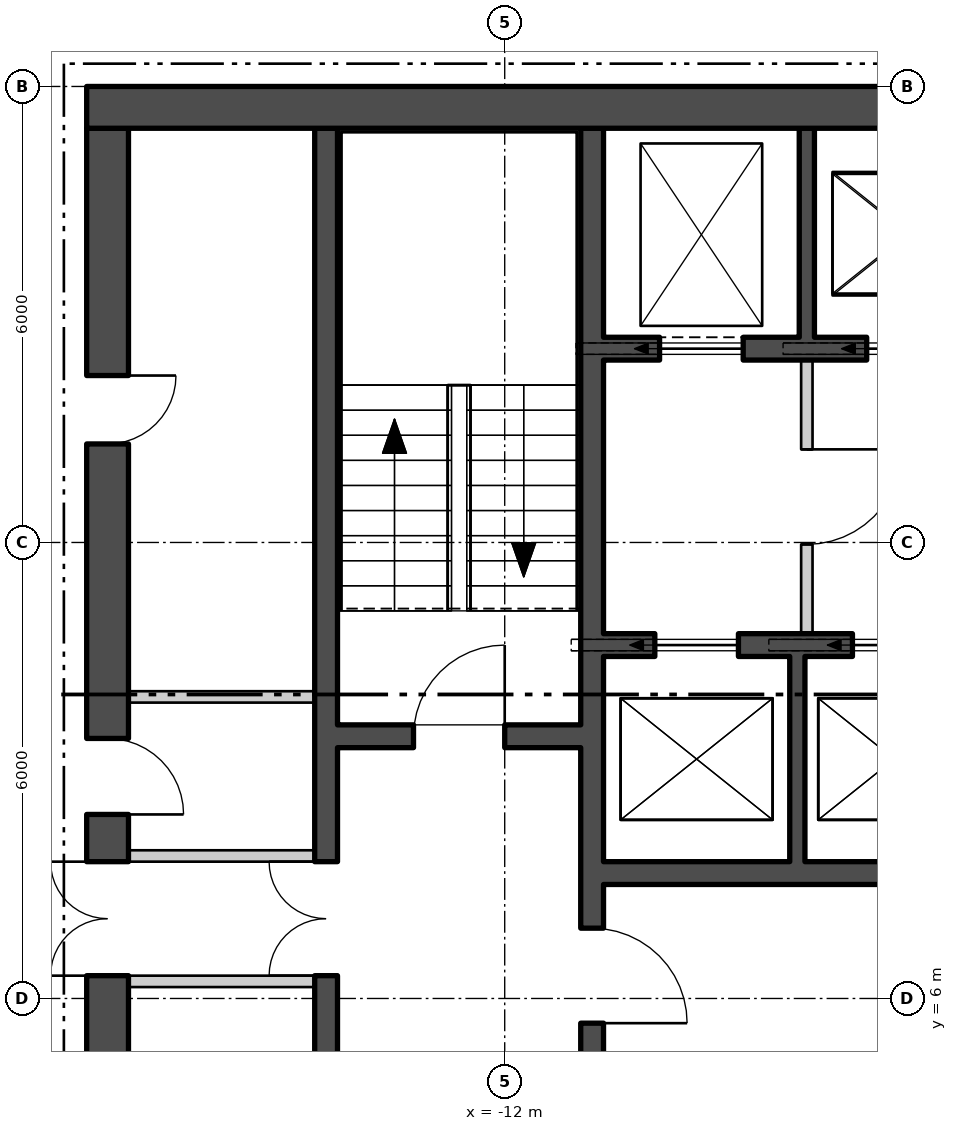
"""IFC4 building model, lengths in metres.
Left out: names, types, materials, properties, quantities, classifications, styles, units other than length and angle.
Written with IfcOpenShell. Run it as: python <this file> out.ifc"""

import sys

from ifc_helpers import new_model, si_unit, direction, frame, frame_2d, origin, place, context, subcontext, project, spatial, polyline, rectangle, outline, extrude, element, fill, save


model = new_model("IFC4")
c1 = context("Model", 3, precision=1e-05, world=origin(), true_north=direction((0.0, 1.0)))
c2 = subcontext(c1, "Body", "Model", "MODEL_VIEW")
j1 = project(units=[si_unit("LENGTHUNIT", "METRE"), si_unit("PLANEANGLEUNIT", "RADIAN")], contexts=[c1])
p1 = place(None, origin())
s1 = spatial("IfcSite", under=j1, at=p1, CompositionType="ELEMENT")
p2 = place(p1, origin())
s2 = spatial("IfcBuilding", under=s1, at=p2, CompositionType="ELEMENT")
p3 = place(p2, frame((0.0, 0.0, 133.8)))
s3 = spatial("IfcBuildingStorey", under=s2, at=p3, CompositionType="ELEMENT", Elevation=133.8)
p4 = place(p3, frame((-27.365, 12.198, -0.18), z_axis=(0.0, 0.0, 1.0), x_axis=(0.500000335318, -0.866025210188, 0.0)))
e1 = element("IfcWall", 1, at=p4, inside=s3, PredefinedType="SOLIDWALL", context=c2, shape_type="SweptSolid", body=[
    extrude(outline(polyline([(-0.13, -0.225), (45.88, -0.225), (45.62, 0.225), (0.13, 0.225), (-0.13, -0.225)])), origin(), (0.0, 0.0, 1.0), 6.0),
])
p5 = place(p4, frame((1.425, 0.0, 1.38)))
e2 = element("IfcOpeningElement", 2, at=p5, cuts=e1, PredefinedType="OPENING", context=c2, shape_type="SweptSolid", body=[
    extrude(rectangle(XDim=2.4, YDim=3.6, at=frame_2d((1.2, 1.8))), frame((0.0, 0.235, 0.0), z_axis=(0.0, -1.0, 0.0), x_axis=(1.0, 0.0, 0.0)), (0.0, 0.0, 1.0), 0.47),
])
p6 = place(p4, frame((5.895, 0.0, 1.38)))
e3 = element("IfcOpeningElement", 3, at=p6, cuts=e1, PredefinedType="OPENING", context=c2, shape_type="SweptSolid", body=[
    extrude(rectangle(XDim=2.4, YDim=3.6, at=frame_2d((1.2, 1.8))), frame((0.0, 0.235, 0.0), z_axis=(0.0, -1.0, 0.0), x_axis=(1.0, 0.0, 0.0)), (0.0, 0.0, 1.0), 0.47),
])
p7 = place(p4, frame((10.403, 0.0, 1.38)))
e4 = element("IfcOpeningElement", 4, at=p7, cuts=e1, PredefinedType="OPENING", context=c2, shape_type="SweptSolid", body=[
    extrude(rectangle(XDim=2.4, YDim=3.6, at=frame_2d((1.2, 1.8))), frame((0.0, 0.235, 0.0), z_axis=(0.0, -1.0, 0.0), x_axis=(1.0, 0.0, 0.0)), (0.0, 0.0, 1.0), 0.47),
])
p8 = place(p4, frame((14.912, 0.0, 1.38)))
e5 = element("IfcOpeningElement", 5, at=p8, cuts=e1, PredefinedType="OPENING", context=c2, shape_type="SweptSolid", body=[
    extrude(rectangle(XDim=2.4, YDim=3.6, at=frame_2d((1.2, 1.8))), frame((0.0, 0.235, 0.0), z_axis=(0.0, -1.0, 0.0), x_axis=(1.0, 0.0, 0.0)), (0.0, 0.0, 1.0), 0.47),
])
p9 = place(p4, frame((19.421, 0.0, 1.38)))
e6 = element("IfcOpeningElement", 6, at=p9, cuts=e1, PredefinedType="OPENING", context=c2, shape_type="SweptSolid", body=[
    extrude(rectangle(XDim=2.4, YDim=3.6, at=frame_2d((1.2, 1.8))), frame((0.0, 0.235, 0.0), z_axis=(0.0, -1.0, 0.0), x_axis=(1.0, 0.0, 0.0)), (0.0, 0.0, 1.0), 0.47),
])
p10 = place(p4, frame((23.929, 0.0, 1.38)))
e7 = element("IfcOpeningElement", 7, at=p10, cuts=e1, PredefinedType="OPENING", context=c2, shape_type="SweptSolid", body=[
    extrude(rectangle(XDim=2.4, YDim=3.6, at=frame_2d((1.2, 1.8))), frame((0.0, 0.235, 0.0), z_axis=(0.0, -1.0, 0.0), x_axis=(1.0, 0.0, 0.0)), (0.0, 0.0, 1.0), 0.47),
])
p11 = place(p4, frame((28.438, 0.0, 1.38)))
e8 = element("IfcOpeningElement", 8, at=p11, cuts=e1, PredefinedType="OPENING", context=c2, shape_type="SweptSolid", body=[
    extrude(rectangle(XDim=2.4, YDim=3.6, at=frame_2d((1.2, 1.8))), frame((0.0, 0.235, 0.0), z_axis=(0.0, -1.0, 0.0), x_axis=(1.0, 0.0, 0.0)), (0.0, 0.0, 1.0), 0.47),
])
p12 = place(p4, frame((32.947, 0.0, 1.38)))
e9 = element("IfcOpeningElement", 9, at=p12, cuts=e1, PredefinedType="OPENING", context=c2, shape_type="SweptSolid", body=[
    extrude(rectangle(XDim=2.4, YDim=3.6, at=frame_2d((1.2, 1.8))), frame((0.0, 0.235, 0.0), z_axis=(0.0, -1.0, 0.0), x_axis=(1.0, 0.0, 0.0)), (0.0, 0.0, 1.0), 0.47),
])
p13 = place(p4, frame((37.455, 0.0, 1.38)))
e10 = element("IfcOpeningElement", 10, at=p13, cuts=e1, PredefinedType="OPENING", context=c2, shape_type="SweptSolid", body=[
    extrude(rectangle(XDim=2.4, YDim=3.6, at=frame_2d((1.2, 1.8))), frame((0.0, 0.235, 0.0), z_axis=(0.0, -1.0, 0.0), x_axis=(1.0, 0.0, 0.0)), (0.0, 0.0, 1.0), 0.47),
])
p14 = place(p4, frame((41.925, 0.0, 1.38)))
e11 = element("IfcOpeningElement", 11, at=p14, cuts=e1, PredefinedType="OPENING", context=c2, shape_type="SweptSolid", body=[
    extrude(rectangle(XDim=2.4, YDim=3.6, at=frame_2d((1.2, 1.8))), frame((0.0, 0.235, 0.0), z_axis=(0.0, -1.0, 0.0), x_axis=(1.0, 0.0, 0.0)), (0.0, 0.0, 1.0), 0.47),
])
p15 = place(p3, frame((-17.5, 17.725, 0.0), z_axis=(0.0, 0.0, 1.0), x_axis=(1.0, 0.0, 0.0)))
e12 = element("IfcWall", 12, at=p15, inside=s3, PredefinedType="SHEAR", context=c2, shape_type="SweptSolid", body=[
    extrude(rectangle(XDim=35.0, YDim=0.55, at=frame_2d((17.5, 0.0))), origin(), (0.0, 0.0, 1.0), 5.8),
])
p16 = place(p3, frame((-17.225, 0.55, 0.0), z_axis=(0.0, 0.0, 1.0), x_axis=(0.0, 1.0, 0.0)))
e13 = element("IfcWall", 13, at=p16, inside=s3, PredefinedType="SHEAR", context=c2, shape_type="SweptSolid", body=[
    extrude(rectangle(XDim=16.9, YDim=0.55, at=frame_2d((8.45, 0.0))), origin(), (0.0, 0.0, 1.0), 5.8),
])
p17 = place(p16, frame((5.75, 0.0, 0.0)))
e14 = element("IfcOpeningElement", 14, at=p17, cuts=e13, PredefinedType="OPENING", context=c2, shape_type="SweptSolid", body=[
    extrude(rectangle(XDim=1.5, YDim=2.1, at=frame_2d((0.75, 1.05))), frame((0.0, 0.285, 0.0), z_axis=(0.0, -1.0, 0.0), x_axis=(1.0, 0.0, 0.0)), (0.0, 0.0, 1.0), 0.57),
])
p18 = place(p16, frame((0.4, 0.0, 0.0)))
e15 = element("IfcOpeningElement", 15, at=p18, cuts=e13, PredefinedType="OPENING", context=c2, shape_type="SweptSolid", body=[
    extrude(rectangle(XDim=0.9, YDim=2.1, at=frame_2d((0.45, 1.05))), frame((0.0, 0.285, 0.0), z_axis=(0.0, -1.0, 0.0), x_axis=(1.0, 0.0, 0.0)), (0.0, 0.0, 1.0), 0.57),
])
p19 = place(p16, frame((2.289, 0.0, 0.0)))
e16 = element("IfcOpeningElement", 16, at=p19, cuts=e13, PredefinedType="OPENING", context=c2, shape_type="SweptSolid", body=[
    extrude(rectangle(XDim=0.9, YDim=2.1, at=frame_2d((0.45, 1.05))), frame((0.0, 0.285, 0.0), z_axis=(0.0, -1.0, 0.0), x_axis=(1.0, 0.0, 0.0)), (0.0, 0.0, 1.0), 0.57),
])
p20 = place(p16, frame((7.871, 0.0, 0.0)))
e17 = element("IfcOpeningElement", 17, at=p20, cuts=e13, PredefinedType="OPENING", context=c2, shape_type="SweptSolid", body=[
    extrude(rectangle(XDim=1.0, YDim=2.1, at=frame_2d((0.5, 1.05))), frame((0.0, 0.285, 0.0), z_axis=(0.0, -1.0, 0.0), x_axis=(1.0, 0.0, 0.0)), (0.0, 0.0, 1.0), 0.57),
])
p21 = place(p16, frame((12.746, 0.0, 0.0)))
e18 = element("IfcOpeningElement", 18, at=p21, cuts=e13, PredefinedType="OPENING", context=c2, shape_type="SweptSolid", body=[
    extrude(rectangle(XDim=0.9, YDim=2.1, at=frame_2d((0.45, 1.05))), frame((0.0, 0.285, 0.0), z_axis=(0.0, -1.0, 0.0), x_axis=(1.0, 0.0, 0.0)), (0.0, 0.0, 1.0), 0.57),
])
p22 = place(p3, frame((-10.85, 0.55, 0.0), z_axis=(0.0, 0.0, 1.0), x_axis=(0.0, 1.0, 0.0)))
e19 = element("IfcWall", 19, at=p22, inside=s3, PredefinedType="SHEAR", context=c2, shape_type="SweptSolid", body=[
    extrude(rectangle(XDim=16.9, YDim=0.3, at=frame_2d((8.45, 0.0))), origin(), (0.0, 0.0, 1.0), 5.8),
])
p23 = place(p22, frame((5.125, 0.0, 0.0)))
e20 = element("IfcOpeningElement", 20, at=p23, cuts=e19, PredefinedType="OPENING", context=c2, shape_type="SweptSolid", body=[
    extrude(rectangle(XDim=1.25, YDim=2.1, at=frame_2d((0.625, 1.05))), frame((0.0, 0.16, 0.0), z_axis=(0.0, -1.0, 0.0), x_axis=(1.0, 0.0, 0.0)), (0.0, 0.0, 1.0), 0.32),
])
p24 = place(p22, frame((1.55, 0.0, 0.0)))
e21 = element("IfcOpeningElement", 21, at=p24, cuts=e19, PredefinedType="OPENING", context=c2, shape_type="SweptSolid", body=[
    extrude(rectangle(XDim=1.0, YDim=2.1, at=frame_2d((0.5, 1.05))), frame((0.0, 0.16, 0.0), z_axis=(0.0, -1.0, 0.0), x_axis=(1.0, 0.0, 0.0)), (0.0, 0.0, 1.0), 0.32),
])
p25 = place(p3, frame((-14.35, 0.55, 0.0), z_axis=(0.0, 0.0, 1.0), x_axis=(0.0, 1.0, 0.0)))
e22 = element("IfcWall", 22, at=p25, inside=s3, PredefinedType="SHEAR", context=c2, shape_type="SweptSolid", body=[
    extrude(rectangle(XDim=16.9, YDim=0.3, at=frame_2d((8.45, 0.0))), origin(), (0.0, 0.0, 1.0), 5.8),
])
p26 = place(p25, frame((5.75, 0.0, 0.0)))
e23 = element("IfcOpeningElement", 23, at=p26, cuts=e22, PredefinedType="OPENING", context=c2, shape_type="SweptSolid", body=[
    extrude(rectangle(XDim=1.5, YDim=2.1, at=frame_2d((0.75, 1.05))), frame((0.0, 0.16, 0.0), z_axis=(0.0, -1.0, 0.0), x_axis=(1.0, 0.0, 0.0)), (0.0, 0.0, 1.0), 0.32),
])
p27 = place(p3, frame((-14.2, 9.45, 0.0), z_axis=(0.0, 0.0, 1.0), x_axis=(1.0, 0.0, 0.0)))
e24 = element("IfcWall", 24, at=p27, inside=s3, PredefinedType="SHEAR", context=c2, shape_type="SweptSolid", body=[
    extrude(rectangle(XDim=3.2, YDim=0.3, at=frame_2d((1.6, 0.0))), origin(), (0.0, 0.0, 1.0), 5.8),
])
p28 = place(p27, frame((1.0, 0.0, 0.0)))
e25 = element("IfcOpeningElement", 25, at=p28, cuts=e24, PredefinedType="OPENING", context=c2, shape_type="SweptSolid", body=[
    extrude(rectangle(XDim=1.2, YDim=2.1, at=frame_2d((0.6, 1.05))), frame((0.0, 0.16, 0.0), z_axis=(0.0, -1.0, 0.0), x_axis=(1.0, 0.0, 0.0)), (0.0, 0.0, 1.0), 0.32),
])
p29 = place(p3, frame((-10.7, 14.55, 0.0), z_axis=(0.0, 0.0, 1.0), x_axis=(1.0, 0.0, 0.0)))
e26 = element("IfcWall", 26, at=p29, inside=s3, PredefinedType="SHEAR", context=c2, shape_type="SweptSolid", body=[
    extrude(rectangle(XDim=21.4, YDim=0.3, at=frame_2d((10.7, 0.0))), origin(), (0.0, 0.0, 1.0), 5.8),
])
p30 = place(p29, frame((0.738, 0.0, 0.0)))
e27 = element("IfcOpeningElement", 27, at=p30, cuts=e26, PredefinedType="OPENING", context=c2, shape_type="SweptSolid", body=[
    extrude(rectangle(XDim=1.1, YDim=2.1, at=frame_2d((0.55, 1.05))), frame((0.0, 0.16, 0.0), z_axis=(0.0, -1.0, 0.0), x_axis=(1.0, 0.0, 0.0)), (0.0, 0.0, 1.0), 0.32),
])
p31 = place(p29, frame((3.462, 0.0, 0.0)))
e28 = element("IfcOpeningElement", 28, at=p31, cuts=e26, PredefinedType="OPENING", context=c2, shape_type="SweptSolid", body=[
    extrude(rectangle(XDim=1.1, YDim=2.1, at=frame_2d((0.55, 1.05))), frame((0.0, 0.16, 0.0), z_axis=(0.0, -1.0, 0.0), x_axis=(1.0, 0.0, 0.0)), (0.0, 0.0, 1.0), 0.32),
])
p32 = place(p29, frame((6.138, 0.0, 0.0)))
e29 = element("IfcOpeningElement", 29, at=p32, cuts=e26, PredefinedType="OPENING", context=c2, shape_type="SweptSolid", body=[
    extrude(rectangle(XDim=1.1, YDim=2.1, at=frame_2d((0.55, 1.05))), frame((0.0, 0.16, 0.0), z_axis=(0.0, -1.0, 0.0), x_axis=(1.0, 0.0, 0.0)), (0.0, 0.0, 1.0), 0.32),
])
p33 = place(p29, frame((8.812, 0.0, 0.0)))
e30 = element("IfcOpeningElement", 30, at=p33, cuts=e26, PredefinedType="OPENING", context=c2, shape_type="SweptSolid", body=[
    extrude(rectangle(XDim=1.1, YDim=2.1, at=frame_2d((0.55, 1.05))), frame((0.0, 0.16, 0.0), z_axis=(0.0, -1.0, 0.0), x_axis=(1.0, 0.0, 0.0)), (0.0, 0.0, 1.0), 0.32),
])
p34 = place(p29, frame((11.488, 0.0, 0.0)))
e31 = element("IfcOpeningElement", 31, at=p34, cuts=e26, PredefinedType="OPENING", context=c2, shape_type="SweptSolid", body=[
    extrude(rectangle(XDim=1.1, YDim=2.1, at=frame_2d((0.55, 1.05))), frame((0.0, 0.16, 0.0), z_axis=(0.0, -1.0, 0.0), x_axis=(1.0, 0.0, 0.0)), (0.0, 0.0, 1.0), 0.32),
])
p35 = place(p29, frame((14.162, 0.0, 0.0)))
e32 = element("IfcOpeningElement", 32, at=p35, cuts=e26, PredefinedType="OPENING", context=c2, shape_type="SweptSolid", body=[
    extrude(rectangle(XDim=1.1, YDim=2.1, at=frame_2d((0.55, 1.05))), frame((0.0, 0.16, 0.0), z_axis=(0.0, -1.0, 0.0), x_axis=(1.0, 0.0, 0.0)), (0.0, 0.0, 1.0), 0.32),
])
p36 = place(p29, frame((16.837, 0.0, 0.0)))
e33 = element("IfcOpeningElement", 33, at=p36, cuts=e26, PredefinedType="OPENING", context=c2, shape_type="SweptSolid", body=[
    extrude(rectangle(XDim=1.1, YDim=2.1, at=frame_2d((0.55, 1.05))), frame((0.0, 0.16, 0.0), z_axis=(0.0, -1.0, 0.0), x_axis=(1.0, 0.0, 0.0)), (0.0, 0.0, 1.0), 0.32),
])
p37 = place(p29, frame((19.562, 0.0, 0.0)))
e34 = element("IfcOpeningElement", 34, at=p37, cuts=e26, PredefinedType="OPENING", context=c2, shape_type="SweptSolid", body=[
    extrude(rectangle(XDim=1.1, YDim=2.1, at=frame_2d((0.55, 1.05))), frame((0.0, 0.16, 0.0), z_axis=(0.0, -1.0, 0.0), x_axis=(1.0, 0.0, 0.0)), (0.0, 0.0, 1.0), 0.32),
])
p38 = place(p3, frame((-10.7, 10.65, 0.0), z_axis=(0.0, 0.0, 1.0), x_axis=(1.0, 0.0, 0.0)))
e35 = element("IfcWall", 35, at=p38, inside=s3, PredefinedType="SHEAR", context=c2, shape_type="SweptSolid", body=[
    extrude(rectangle(XDim=10.3, YDim=0.3, at=frame_2d((5.15, 0.0))), origin(), (0.0, 0.0, 1.0), 5.8),
])
p39 = place(p38, frame((0.675, 0.0, 0.0)))
e36 = element("IfcOpeningElement", 36, at=p39, cuts=e35, PredefinedType="OPENING", context=c2, shape_type="SweptSolid", body=[
    extrude(rectangle(XDim=1.1, YDim=2.1, at=frame_2d((0.55, 1.05))), frame((0.0, 0.16, 0.0), z_axis=(0.0, -1.0, 0.0), x_axis=(1.0, 0.0, 0.0)), (0.0, 0.0, 1.0), 0.32),
])
p40 = place(p38, frame((3.275, 0.0, 0.0)))
e37 = element("IfcOpeningElement", 37, at=p40, cuts=e35, PredefinedType="OPENING", context=c2, shape_type="SweptSolid", body=[
    extrude(rectangle(XDim=1.1, YDim=2.1, at=frame_2d((0.55, 1.05))), frame((0.0, 0.16, 0.0), z_axis=(0.0, -1.0, 0.0), x_axis=(1.0, 0.0, 0.0)), (0.0, 0.0, 1.0), 0.32),
])
p41 = place(p38, frame((5.825, 0.0, 0.0)))
e38 = element("IfcOpeningElement", 38, at=p41, cuts=e35, PredefinedType="OPENING", context=c2, shape_type="SweptSolid", body=[
    extrude(rectangle(XDim=1.1, YDim=2.1, at=frame_2d((0.55, 1.05))), frame((0.0, 0.16, 0.0), z_axis=(0.0, -1.0, 0.0), x_axis=(1.0, 0.0, 0.0)), (0.0, 0.0, 1.0), 0.32),
])
p42 = place(p38, frame((8.425, 0.0, 0.0)))
e39 = element("IfcOpeningElement", 39, at=p42, cuts=e35, PredefinedType="OPENING", context=c2, shape_type="SweptSolid", body=[
    extrude(rectangle(XDim=1.0, YDim=2.1, at=frame_2d((0.5, 1.05))), frame((0.0, 0.16, 0.0), z_axis=(0.0, -1.0, 0.0), x_axis=(1.0, 0.0, 0.0)), (0.0, 0.0, 1.0), 0.32),
])
p43 = place(p3, frame((-10.7, 7.65, 0.0), z_axis=(0.0, 0.0, 1.0), x_axis=(1.0, 0.0, 0.0)))
e40 = element("IfcWall", 40, at=p43, inside=s3, PredefinedType="SHEAR", context=c2, shape_type="SweptSolid", body=[
    extrude(rectangle(XDim=10.3, YDim=0.3, at=frame_2d((5.15, 0.0))), origin(), (0.0, 0.0, 1.0), 5.8),
])
p44 = place(p3, frame((-8.025, 14.7, 0.0), z_axis=(0.0, 0.0, 1.0), x_axis=(0.0, 1.0, 0.0)))
e41 = element("IfcWall", 41, at=p44, inside=s3, PredefinedType="SHEAR", context=c2, shape_type="SweptSolid", body=[
    extrude(rectangle(XDim=2.75, YDim=0.2, at=frame_2d((1.375, 0.0))), origin(), (0.0, 0.0, 1.0), 5.8),
])
p45 = place(p3, frame((-8.15, 7.8, 0.0), z_axis=(0.0, 0.0, 1.0), x_axis=(0.0, 1.0, 0.0)))
e42 = element("IfcWall", 42, at=p45, inside=s3, PredefinedType="SHEAR", context=c2, shape_type="SweptSolid", body=[
    extrude(rectangle(XDim=2.7, YDim=0.2, at=frame_2d((1.35, 0.0))), origin(), (0.0, 0.0, 1.0), 5.8),
])
p46 = place(p3, frame((-8.025, 10.8, 0.0), z_axis=(0.0, 0.0, 1.0), x_axis=(0.0, 1.0, 0.0)))
e43 = element("IfcWall", 43, at=p46, inside=s3, PredefinedType="PARTITIONING", context=c2, shape_type="SweptSolid", body=[
    extrude(rectangle(XDim=3.6, YDim=0.15, at=frame_2d((1.8, 0.0))), origin(), (0.0, 0.0, 1.0), 5.8),
])
p47 = place(p46, frame((1.175, 0.0, 0.0)))
e44 = element("IfcOpeningElement", 44, at=p47, cuts=e43, PredefinedType="OPENING", context=c2, shape_type="SweptSolid", body=[
    extrude(rectangle(XDim=1.25, YDim=2.1, at=frame_2d((0.625, 1.05))), frame((0.0, 0.085, 0.0), z_axis=(0.0, -1.0, 0.0), x_axis=(1.0, 0.0, 0.0)), (0.0, 0.0, 1.0), 0.17),
])
p48 = place(p3, frame((-16.95, 6.225, 0.0), z_axis=(0.0, 0.0, 1.0), x_axis=(1.0, 0.0, 0.0)))
e45 = element("IfcWall", 45, at=p48, inside=s3, PredefinedType="PARTITIONING", context=c2, shape_type="SweptSolid", body=[
    extrude(rectangle(XDim=2.45, YDim=0.15, at=frame_2d((1.225, 0.0))), origin(), (0.0, 0.0, 1.0), 5.8),
])
p49 = place(p3, frame((-16.95, 7.875, 0.0), z_axis=(0.0, 0.0, 1.0), x_axis=(1.0, 0.0, 0.0)))
e46 = element("IfcWall", 46, at=p49, inside=s3, PredefinedType="PARTITIONING", context=c2, shape_type="SweptSolid", body=[
    extrude(rectangle(XDim=2.45, YDim=0.15, at=frame_2d((1.225, 0.0))), origin(), (0.0, 0.0, 1.0), 5.5),
])
p50 = place(p3, frame((-16.95, 9.968, 0.0), z_axis=(0.0, 0.0, 1.0), x_axis=(1.0, 0.0, 0.0)))
e47 = element("IfcWall", 47, at=p50, inside=s3, PredefinedType="PARTITIONING", context=c2, shape_type="SweptSolid", body=[
    extrude(rectangle(XDim=2.45, YDim=0.15, at=frame_2d((1.225, 0.0))), origin(), (0.0, 0.0, 1.0), 5.8),
])
p51 = place(p30, origin())
e48 = element("IfcDoor", 48, at=p51, inside=s3, OperationType="SLIDING_TO_LEFT", PredefinedType="DOOR", context=c2, shape_type="SweptSolid", body=[
    extrude(rectangle(XDim=1.1, YDim=2.1, at=frame_2d((0.55, 1.05))), frame((0.0, 0.025, 0.0), z_axis=(0.0, -1.0, 0.0), x_axis=(1.0, 0.0, 0.0)), (0.0, 0.0, 1.0), 0.05),
])
fill(e27, e48)
p52 = place(p31, origin())
e49 = element("IfcDoor", 49, at=p52, inside=s3, OperationType="SLIDING_TO_LEFT", PredefinedType="DOOR", context=c2, shape_type="SweptSolid", body=[
    extrude(rectangle(XDim=1.1, YDim=2.1, at=frame_2d((0.55, 1.05))), frame((0.0, 0.025, 0.0), z_axis=(0.0, -1.0, 0.0), x_axis=(1.0, 0.0, 0.0)), (0.0, 0.0, 1.0), 0.05),
])
fill(e28, e49)
p53 = place(p39, origin())
e50 = element("IfcDoor", 50, at=p53, inside=s3, OperationType="SLIDING_TO_LEFT", PredefinedType="DOOR", context=c2, shape_type="SweptSolid", body=[
    extrude(rectangle(XDim=1.1, YDim=2.1, at=frame_2d((0.55, 1.05))), frame((0.0, 0.025, 0.0), z_axis=(0.0, -1.0, 0.0), x_axis=(1.0, 0.0, 0.0)), (0.0, 0.0, 1.0), 0.05),
])
fill(e36, e50)
p54 = place(p40, origin())
e51 = element("IfcDoor", 51, at=p54, inside=s3, OperationType="SLIDING_TO_LEFT", PredefinedType="DOOR", context=c2, shape_type="SweptSolid", body=[
    extrude(rectangle(XDim=1.1, YDim=2.1, at=frame_2d((0.55, 1.05))), frame((0.0, 0.025, 0.0), z_axis=(0.0, -1.0, 0.0), x_axis=(1.0, 0.0, 0.0)), (0.0, 0.0, 1.0), 0.05),
])
fill(e37, e51)
p55 = place(p47, origin())
e52 = element("IfcDoor", 52, at=p55, inside=s3, OperationType="SINGLE_SWING_RIGHT", PredefinedType="DOOR", context=c2, shape_type="SweptSolid", body=[
    extrude(rectangle(XDim=1.25, YDim=2.1, at=frame_2d((0.625, 1.05))), frame((0.0, 0.025, 0.0), z_axis=(0.0, -1.0, 0.0), x_axis=(1.0, 0.0, 0.0)), (0.0, 0.0, 1.0), 0.05),
])
fill(e44, e52)
p56 = place(p28, origin())
e53 = element("IfcDoor", 53, at=p56, inside=s3, OperationType="SINGLE_SWING_LEFT", PredefinedType="DOOR", context=c2, shape_type="SweptSolid", body=[
    extrude(rectangle(XDim=1.2, YDim=2.1, at=frame_2d((0.6, 1.05))), frame((0.0, 0.025, 0.0), z_axis=(0.0, -1.0, 0.0), x_axis=(1.0, 0.0, 0.0)), (0.0, 0.0, 1.0), 0.05),
])
fill(e25, e53)
p57 = place(p23, origin())
e54 = element("IfcDoor", 54, at=p57, inside=s3, OperationType="SINGLE_SWING_LEFT", PredefinedType="DOOR", context=c2, shape_type="SweptSolid", body=[
    extrude(rectangle(XDim=1.25, YDim=2.1, at=frame_2d((0.625, 1.05))), frame((0.0, 0.025, 0.0), z_axis=(0.0, -1.0, 0.0), x_axis=(1.0, 0.0, 0.0)), (0.0, 0.0, 1.0), 0.05),
])
fill(e20, e54)
p58 = place(p26, origin())
e55 = element("IfcDoor", 55, at=p58, inside=s3, OperationType="DOUBLE_DOOR_SINGLE_SWING", PredefinedType="DOOR", context=c2, shape_type="SweptSolid", body=[
    extrude(rectangle(XDim=1.5, YDim=2.1, at=frame_2d((0.75, 1.05))), frame((0.0, 0.025, 0.0), z_axis=(0.0, -1.0, 0.0), x_axis=(1.0, 0.0, 0.0)), (0.0, 0.0, 1.0), 0.05),
])
fill(e23, e55)
p59 = place(p17, origin())
e56 = element("IfcDoor", 56, at=p59, inside=s3, OperationType="DOUBLE_DOOR_SINGLE_SWING", PredefinedType="DOOR", context=c2, shape_type="SweptSolid", body=[
    extrude(rectangle(XDim=1.5, YDim=2.1, at=frame_2d((0.75, 1.05))), frame((0.0, 0.025, 0.0), z_axis=(0.0, -1.0, 0.0), x_axis=(1.0, 0.0, 0.0)), (0.0, 0.0, 1.0), 0.05),
])
fill(e14, e56)
p60 = place(p20, origin())
e57 = element("IfcDoor", 57, at=p60, inside=s3, OperationType="SINGLE_SWING_LEFT", PredefinedType="DOOR", context=c2, shape_type="SweptSolid", body=[
    extrude(rectangle(XDim=1.0, YDim=2.1, at=frame_2d((0.5, 1.05))), frame((0.0, 0.025, 0.0), z_axis=(0.0, -1.0, 0.0), x_axis=(1.0, 0.0, 0.0)), (0.0, 0.0, 1.0), 0.05),
])
fill(e17, e57)
p61 = place(p21, origin())
e58 = element("IfcDoor", 58, at=p61, inside=s3, OperationType="SINGLE_SWING_RIGHT", PredefinedType="DOOR", context=c2, shape_type="SweptSolid", body=[
    extrude(rectangle(XDim=0.9, YDim=2.1, at=frame_2d((0.45, 1.05))), frame((0.0, 0.025, 0.0), z_axis=(0.0, -1.0, 0.0), x_axis=(1.0, 0.0, 0.0)), (0.0, 0.0, 1.0), 0.05),
])
fill(e18, e58)
save(model, sys.argv[1])
